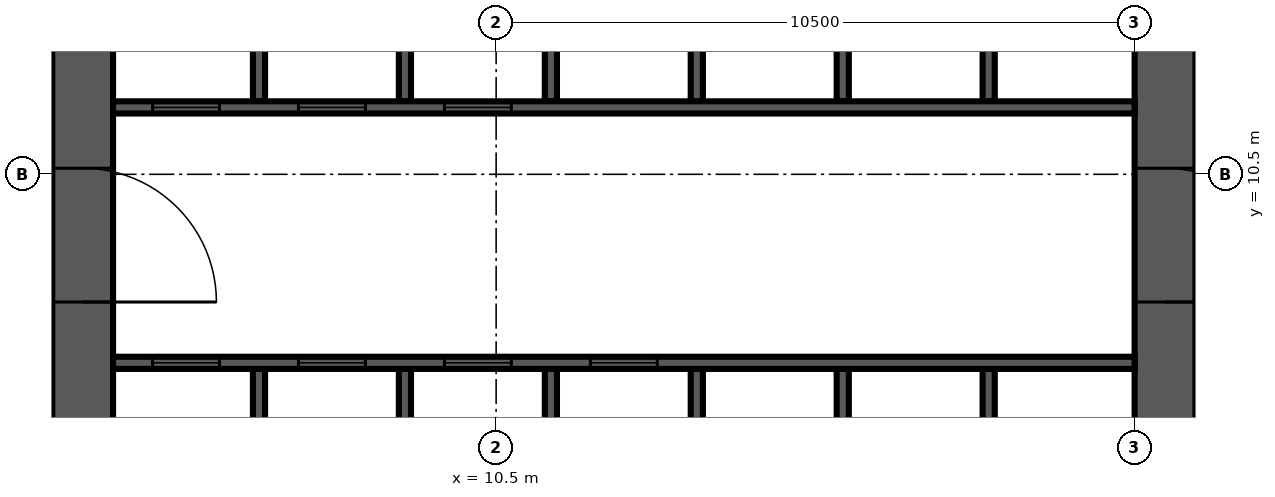
"""IFC4 building model, lengths in metres.
Left out: names, types, materials, properties, quantities, classifications, styles, units other than length and angle.
Written with IfcOpenShell. Run it as: python <this file> out.ifc"""

import sys

from ifc_helpers import new_model, si_unit, direction, frame, frame_2d, origin, place, context, subcontext, project, spatial, rectangle, extrude, source, transform, mapped, element, fill, save


model = new_model("IFC4")
c1 = context("Model", 3, precision=1e-05, world=origin(), true_north=direction((0.0, 1.0)))
c2 = subcontext(c1, "Body", "Model", "MODEL_VIEW")
j1 = project(units=[si_unit("LENGTHUNIT", "METRE"), si_unit("PLANEANGLEUNIT", "RADIAN")], contexts=[c1])
p1 = place(None, origin())
s1 = spatial("IfcSite", under=j1, at=p1, CompositionType="ELEMENT")
p2 = place(p1, origin())
s2 = spatial("IfcBuilding", under=s1, at=p2, CompositionType="ELEMENT")
p3 = place(p2, frame((0.0, 0.0, 124.5)))
s3 = spatial("IfcBuildingStorey", under=s2, at=p3, CompositionType="ELEMENT", Elevation=124.5)
m1 = source(origin(), c2, "Body", "SweptSolid", [
    extrude(rectangle(XDim=17.8, YDim=1.0, at=frame_2d((8.9, 0.0))), origin(), (0.0, 0.0, 1.0), 4.2),
])
p4 = place(p3, frame((3.7, 4.2, 0.0), z_axis=(0.0, 0.0, 1.0), x_axis=(0.0, 1.0, 0.0)))
e1 = element("IfcWall", 1, at=p4, inside=s3, PredefinedType="SHEAR", context=c2, shape_type="MappedRepresentation", body=[
    mapped(m1, transform((0.0, 0.0, 0.0), scale=1.0)),
])
m2 = source(origin(), c2, "Body", "SweptSolid", [
    extrude(rectangle(XDim=2.2, YDim=2.1, at=frame_2d((1.1, 1.05))), frame((0.0, 0.51, 0.0), z_axis=(0.0, -1.0, 0.0), x_axis=(1.0, 0.0, 0.0)), (0.0, 0.0, 1.0), 1.02),
])
p5 = place(p4, frame((4.2, 0.0, 0.0)))
e2 = element("IfcOpeningElement", 2, at=p5, cuts=e1, PredefinedType="OPENING", context=c2, shape_type="MappedRepresentation", body=[
    mapped(m2, transform((0.0, 0.0, 0.0), scale=1.0)),
])
m3 = source(origin(), c2, "Body", "SweptSolid", [
    extrude(rectangle(XDim=0.9, YDim=2.1, at=frame_2d((0.45, 1.05))), frame((0.0, 0.51, 0.0), z_axis=(0.0, -1.0, 0.0), x_axis=(1.0, 0.0, 0.0)), (0.0, 0.0, 1.0), 1.02),
])
p6 = place(p4, frame((10.95, 0.0, 0.0)))
e3 = element("IfcOpeningElement", 3, at=p6, cuts=e1, PredefinedType="OPENING", context=c2, shape_type="MappedRepresentation", body=[
    mapped(m3, transform((0.0, 0.0, 0.0), scale=1.0)),
])
m4 = source(origin(), c2, "Body", "SweptSolid", [
    extrude(rectangle(XDim=16.8, YDim=1.0, at=frame_2d((8.4, 0.0))), origin(), (0.0, 0.0, 1.0), 4.2),
])
p7 = place(p3, frame((21.5, 4.2, 0.0), z_axis=(0.0, 0.0, 1.0), x_axis=(0.0, 1.0, 0.0)))
e4 = element("IfcWall", 4, at=p7, inside=s3, PredefinedType="SHEAR", context=c2, shape_type="MappedRepresentation", body=[
    mapped(m4, transform((0.0, 0.0, 0.0), scale=1.0)),
])
p8 = place(p7, frame((4.2, 0.0, 0.0)))
e5 = element("IfcOpeningElement", 5, at=p8, cuts=e4, PredefinedType="OPENING", context=c2, shape_type="MappedRepresentation", body=[
    mapped(m2, transform((0.0, 0.0, 0.0), scale=1.0)),
])
m5 = source(origin(), c2, "Body", "SweptSolid", [
    extrude(rectangle(XDim=1.2, YDim=2.1, at=frame_2d((0.6, 1.05))), frame((0.0, 0.51, 0.0), z_axis=(0.0, -1.0, 0.0), x_axis=(1.0, 0.0, 0.0)), (0.0, 0.0, 1.0), 1.02),
])
p9 = place(p7, frame((14.7, 0.0, 0.0)))
e6 = element("IfcOpeningElement", 6, at=p9, cuts=e4, PredefinedType="OPENING", context=c2, shape_type="MappedRepresentation", body=[
    mapped(m5, transform((0.0, 0.0, 0.0), scale=1.0)),
])
m6 = source(origin(), c2, "Body", "SweptSolid", [
    extrude(rectangle(XDim=3.1, YDim=0.2, at=frame_2d((1.55, 0.0))), origin(), (0.0, 0.0, 1.0), 4.2),
])
for number, where, z_axis, x_axis in (
    (7, (6.6, 4.2, 0.0), (0.0, 0.0, 1.0), (0.0, 1.0, 0.0)),
    (8, (9.0, 4.2, 0.0), (0.0, 0.0, 1.0), (0.0, 1.0, 0.0)),
    (9, (11.4, 4.2, 0.0), (0.0, 0.0, 1.0), (0.0, 1.0, 0.0)),
    (10, (13.8, 4.2, 0.0), (0.0, 0.0, 1.0), (0.0, 1.0, 0.0)),
    (11, (16.2, 4.2, 0.0), (0.0, 0.0, 1.0), (0.0, 1.0, 0.0)),
    (12, (18.6, 4.2, 0.0), (0.0, 0.0, 1.0), (0.0, 1.0, 0.0)),
):
    element("IfcWall", number, at=place(p3, frame(where, z_axis=z_axis, x_axis=x_axis)), inside=s3, PredefinedType="SOLIDWALL", context=c2, shape_type="MappedRepresentation", body=[
        mapped(m6, transform((0.0, 0.0, 0.0), scale=1.0)),
    ])
m7 = source(origin(), c2, "Body", "SweptSolid", [
    extrude(rectangle(XDim=3.0, YDim=0.2, at=frame_2d((1.5, 0.0))), origin(), (0.0, 0.0, 1.0), 4.2),
])
for number, where, z_axis, x_axis in (
    (13, (6.6, 11.7, 0.0), (0.0, 0.0, 1.0), (0.0, 1.0, 0.0)),
    (14, (9.0, 11.7, 0.0), (0.0, 0.0, 1.0), (0.0, 1.0, 0.0)),
    (15, (11.4, 11.7, 0.0), (0.0, 0.0, 1.0), (0.0, 1.0, 0.0)),
    (16, (13.8, 11.7, 0.0), (0.0, 0.0, 1.0), (0.0, 1.0, 0.0)),
    (17, (16.2, 11.7, 0.0), (0.0, 0.0, 1.0), (0.0, 1.0, 0.0)),
    (18, (18.6, 11.7, 0.0), (0.0, 0.0, 1.0), (0.0, 1.0, 0.0)),
):
    element("IfcWall", number, at=place(p3, frame(where, z_axis=z_axis, x_axis=x_axis)), inside=s3, PredefinedType="SOLIDWALL", context=c2, shape_type="MappedRepresentation", body=[
        mapped(m7, transform((0.0, 0.0, 0.0), scale=1.0)),
    ])
m8 = source(origin(), c2, "Body", "SweptSolid", [
    extrude(rectangle(XDim=16.8, YDim=0.2, at=frame_2d((8.4, 0.0))), origin(), (0.0, 0.0, 1.0), 4.2),
])
p10 = place(p3, frame((4.2, 7.4, 0.0), z_axis=(0.0, 0.0, 1.0), x_axis=(1.0, 0.0, 0.0)))
e19 = element("IfcWall", 19, at=p10, inside=s3, PredefinedType="SOLIDWALL", context=c2, shape_type="MappedRepresentation", body=[
    mapped(m8, transform((0.0, 0.0, 0.0), scale=1.0)),
])
m9 = source(origin(), c2, "Body", "SweptSolid", [
    extrude(rectangle(XDim=1.1, YDim=2.1, at=frame_2d((0.55, 1.05))), frame((0.0, 0.11, 0.0), z_axis=(0.0, -1.0, 0.0), x_axis=(1.0, 0.0, 0.0)), (0.0, 0.0, 1.0), 0.22),
])
p11 = place(p10, frame((0.65, 0.0, 0.0)))
e20 = element("IfcOpeningElement", 20, at=p11, cuts=e19, PredefinedType="OPENING", context=c2, shape_type="MappedRepresentation", body=[
    mapped(m9, transform((0.0, 0.0, 0.0), scale=1.0)),
])
p12 = place(p10, frame((3.05, 0.0, 0.0)))
e21 = element("IfcOpeningElement", 21, at=p12, cuts=e19, PredefinedType="OPENING", context=c2, shape_type="MappedRepresentation", body=[
    mapped(m9, transform((0.0, 0.0, 0.0), scale=1.0)),
])
p13 = place(p10, frame((5.45, 0.0, 0.0)))
e22 = element("IfcOpeningElement", 22, at=p13, cuts=e19, PredefinedType="OPENING", context=c2, shape_type="MappedRepresentation", body=[
    mapped(m9, transform((0.0, 0.0, 0.0), scale=1.0)),
])
p14 = place(p10, frame((7.85, 0.0, 0.0)))
e23 = element("IfcOpeningElement", 23, at=p14, cuts=e19, PredefinedType="OPENING", context=c2, shape_type="MappedRepresentation", body=[
    mapped(m9, transform((0.0, 0.0, 0.0), scale=1.0)),
])
p15 = place(p3, frame((4.2, 11.6, 0.0), z_axis=(0.0, 0.0, 1.0), x_axis=(1.0, 0.0, 0.0)))
e24 = element("IfcWall", 24, at=p15, inside=s3, PredefinedType="SOLIDWALL", context=c2, shape_type="MappedRepresentation", body=[
    mapped(m8, transform((0.0, 0.0, 0.0), scale=1.0)),
])
p16 = place(p15, frame((0.65, 0.0, 0.0)))
e25 = element("IfcOpeningElement", 25, at=p16, cuts=e24, PredefinedType="OPENING", context=c2, shape_type="MappedRepresentation", body=[
    mapped(m9, transform((0.0, 0.0, 0.0), scale=1.0)),
])
p17 = place(p15, frame((3.05, 0.0, 0.0)))
e26 = element("IfcOpeningElement", 26, at=p17, cuts=e24, PredefinedType="OPENING", context=c2, shape_type="MappedRepresentation", body=[
    mapped(m9, transform((0.0, 0.0, 0.0), scale=1.0)),
])
p18 = place(p15, frame((5.45, 0.0, 0.0)))
e27 = element("IfcOpeningElement", 27, at=p18, cuts=e24, PredefinedType="OPENING", context=c2, shape_type="MappedRepresentation", body=[
    mapped(m9, transform((0.0, 0.0, 0.0), scale=1.0)),
])
m10 = source(origin(), c2, "Body", "SweptSolid", [
    extrude(rectangle(XDim=1.1, YDim=2.1, at=frame_2d((0.55, 1.05))), frame((0.0, 0.025, 0.0), z_axis=(0.0, -1.0, 0.0), x_axis=(1.0, 0.0, 0.0)), (0.0, 0.0, 1.0), 0.05),
])
p19 = place(p11, origin())
e28 = element("IfcDoor", 28, at=p19, inside=s3, OperationType="SLIDING_TO_LEFT", PredefinedType="DOOR", context=c2, shape_type="MappedRepresentation", body=[
    mapped(m10, transform((0.0, 0.0, 0.0), scale=1.0)),
])
fill(e20, e28)
p20 = place(p12, origin())
e29 = element("IfcDoor", 29, at=p20, inside=s3, OperationType="SLIDING_TO_LEFT", PredefinedType="DOOR", context=c2, shape_type="MappedRepresentation", body=[
    mapped(m10, transform((0.0, 0.0, 0.0), scale=1.0)),
])
fill(e21, e29)
p21 = place(p13, origin())
e30 = element("IfcDoor", 30, at=p21, inside=s3, OperationType="SLIDING_TO_LEFT", PredefinedType="DOOR", context=c2, shape_type="MappedRepresentation", body=[
    mapped(m10, transform((0.0, 0.0, 0.0), scale=1.0)),
])
fill(e22, e30)
p22 = place(p14, origin())
e31 = element("IfcDoor", 31, at=p22, inside=s3, OperationType="SLIDING_TO_LEFT", PredefinedType="DOOR", context=c2, shape_type="MappedRepresentation", body=[
    mapped(m10, transform((0.0, 0.0, 0.0), scale=1.0)),
])
fill(e23, e31)
p23 = place(p16, origin())
e32 = element("IfcDoor", 32, at=p23, inside=s3, OperationType="SLIDING_TO_LEFT", PredefinedType="DOOR", context=c2, shape_type="MappedRepresentation", body=[
    mapped(m10, transform((0.0, 0.0, 0.0), scale=1.0)),
])
fill(e25, e32)
p24 = place(p17, origin())
e33 = element("IfcDoor", 33, at=p24, inside=s3, OperationType="SLIDING_TO_LEFT", PredefinedType="DOOR", context=c2, shape_type="MappedRepresentation", body=[
    mapped(m10, transform((0.0, 0.0, 0.0), scale=1.0)),
])
fill(e26, e33)
p25 = place(p18, origin())
e34 = element("IfcDoor", 34, at=p25, inside=s3, OperationType="SLIDING_TO_LEFT", PredefinedType="DOOR", context=c2, shape_type="MappedRepresentation", body=[
    mapped(m10, transform((0.0, 0.0, 0.0), scale=1.0)),
])
fill(e27, e34)
m11 = source(origin(), c2, "Body", "SweptSolid", [
    extrude(rectangle(XDim=2.2, YDim=2.1, at=frame_2d((1.1, 1.05))), frame((0.0, 0.025, 0.0), z_axis=(0.0, -1.0, 0.0), x_axis=(1.0, 0.0, 0.0)), (0.0, 0.0, 1.0), 0.05),
])
p26 = place(p8, origin())
e35 = element("IfcDoor", 35, at=p26, inside=s3, OperationType="DOUBLE_DOOR_SINGLE_SWING", PredefinedType="DOOR", context=c2, shape_type="MappedRepresentation", body=[
    mapped(m11, transform((0.0, 0.0, 0.0), scale=1.0)),
])
fill(e5, e35)
p27 = place(p5, origin())
e36 = element("IfcDoor", 36, at=p27, inside=s3, OperationType="DOUBLE_DOOR_SINGLE_SWING", PredefinedType="DOOR", context=c2, shape_type="MappedRepresentation", body=[
    mapped(m11, transform((0.0, 0.0, 0.0), scale=1.0)),
])
fill(e2, e36)
save(model, sys.argv[1])
